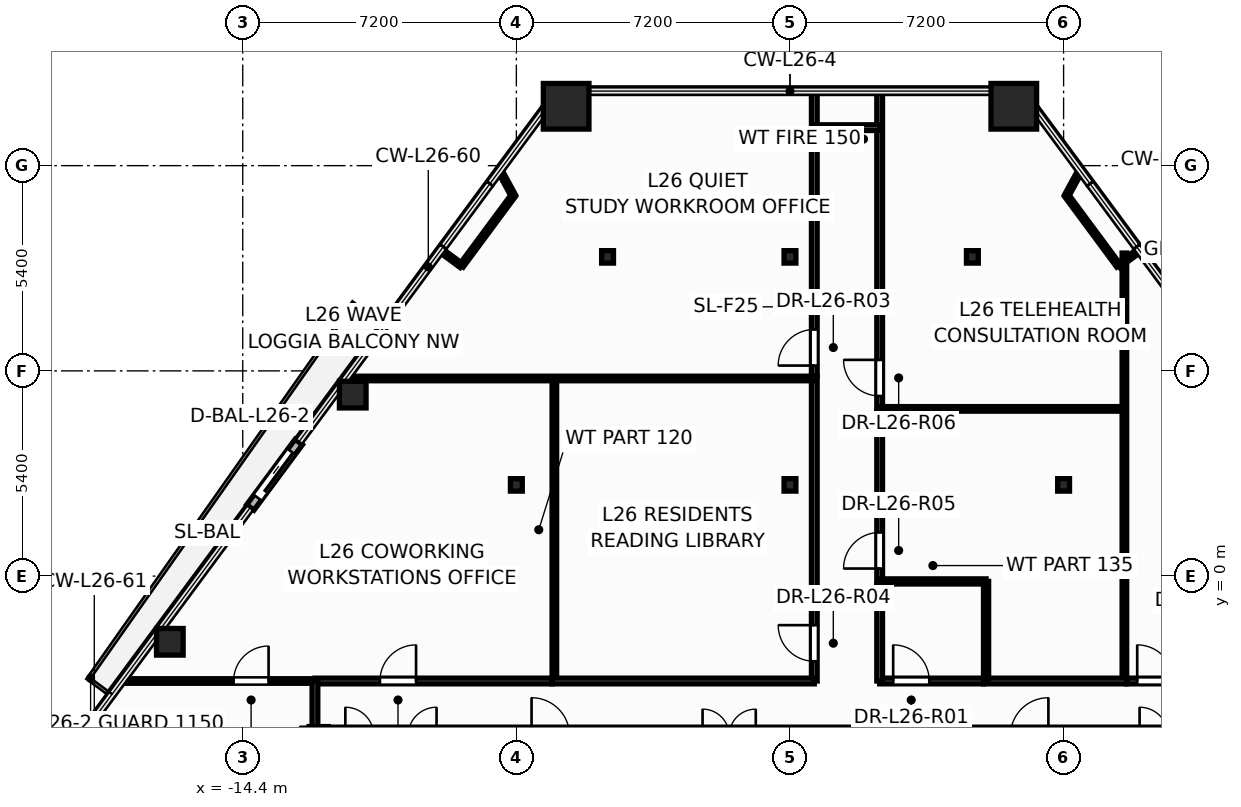
"""IFC4 building model, lengths in metres.
Left out: names, types, materials, properties, quantities, classifications, styles, units other than length and angle.
Written with IfcOpenShell. Run it as: python <this file> out.ifc"""

import sys

from ifc_helpers import new_model, si_unit, direction, frame, frame_2d, origin, origin_2d, place, context, subcontext, project, spatial, rectangle, hollow_rectangle, hollow_circle, i_section, extrude, element, fill, save


model = new_model("IFC4")
c1 = context("Model", 3, precision=1e-05, world=origin(), true_north=direction((0.0, 1.0)))
c2 = subcontext(c1, "Body", "Model", "MODEL_VIEW")
j1 = project(units=[si_unit("LENGTHUNIT", "METRE"), si_unit("PLANEANGLEUNIT", "RADIAN")], contexts=[c1])
p1 = place(None, origin())
s1 = spatial("IfcSite", under=j1, at=p1, CompositionType="ELEMENT")
p2 = place(p1, origin())
s2 = spatial("IfcBuilding", under=s1, at=p2, CompositionType="ELEMENT")
p3 = place(p2, frame((0.0, 0.0, 103.2)))
s3 = spatial("IfcBuildingStorey", under=s2, at=p3, CompositionType="ELEMENT", Elevation=103.2)
for number, where, z_axis, x_axis in (
    (1, (5.89, 12.362, 0.0), (0.0, 0.0, 1.0), (1.0, 0.0, 0.0)),
    (2, (-5.89, 12.362, 0.0), (0.0, 0.0, 1.0), (1.0, 0.0, 0.0)),
):
    element("IfcColumn", number, at=place(p3, frame(where, z_axis=z_axis, x_axis=x_axis)), inside=s3, PredefinedType="COLUMN", context=c2, shape_type="SweptSolid", body=[
        extrude(hollow_rectangle(XDim=1.2, YDim=1.2, WallThickness=0.055, at=origin_2d()), origin(), (0.0, 0.0, 1.0), 3.6),
    ])
for number, where, z_axis, x_axis in (
    (3, (-11.506, 4.775, 0.0), (0.0, 0.0, 1.0), (1.0, 0.0, 0.0)),
    (4, (-16.319, -1.729, 0.0), (0.0, 0.0, 1.0), (1.0, 0.0, 0.0)),
):
    element("IfcColumn", number, at=place(p3, frame(where, z_axis=z_axis, x_axis=x_axis)), inside=s3, PredefinedType="COLUMN", context=c2, shape_type="SweptSolid", body=[
        extrude(hollow_circle(Radius=0.35, WallThickness=0.03, at=origin_2d()), origin(), (0.0, 0.0, 1.0), 3.6),
    ])
p4 = place(p3, frame((-12.4, -4.2, 0.0), z_axis=(0.0, 0.0, 1.0), x_axis=(1.0, 0.0, 0.0)))
e5 = element("IfcColumn", 5, at=p4, inside=s3, PredefinedType="COLUMN", context=c2, shape_type="SweptSolid", body=[
    extrude(i_section(OverallWidth=0.5, OverallDepth=0.482, WebThickness=0.04, FlangeThickness=0.045, at=origin_2d()), origin(), (0.0, 0.0, 1.0), 3.6),
])
for number, where, z_axis, x_axis in (
    (6, (-7.2, 2.4, 0.0), (0.0, 0.0, 1.0), (1.0, 0.0, 0.0)),
    (7, (0.0, 2.4, 0.0), (0.0, 0.0, 1.0), (1.0, 0.0, 0.0)),
    (8, (7.2, 2.4, 0.0), (0.0, 0.0, 1.0), (1.0, 0.0, 0.0)),
    (9, (-4.8, 8.4, 0.0), (0.0, 0.0, 1.0), (1.0, 0.0, 0.0)),
    (10, (0.0, 8.4, 0.0), (0.0, 0.0, 1.0), (1.0, 0.0, 0.0)),
    (11, (4.8, 8.4, 0.0), (0.0, 0.0, 1.0), (1.0, 0.0, 0.0)),
):
    element("IfcColumn", number, at=place(p3, frame(where, z_axis=z_axis, x_axis=x_axis)), inside=s3, PredefinedType="COLUMN", context=c2, shape_type="SweptSolid", body=[
        extrude(i_section(OverallWidth=0.311, OverallDepth=0.327, WebThickness=0.016, FlangeThickness=0.025, at=origin_2d()), origin(), (0.0, 0.0, 1.0), 3.6),
    ])
p5 = place(p3, frame((-12.926, 3.528, -0.015), z_axis=(0.0, 0.0, 1.0), x_axis=(-0.594840056707, -0.803844081235, 0.0)))
e12 = element("IfcWall", 12, at=p5, inside=s3, PredefinedType="STANDARD", context=c2, shape_type="SweptSolid", body=[
    extrude(rectangle(XDim=2.14, YDim=0.24, at=frame_2d((1.07, 0.0))), origin(), (0.0, 0.0, 1.0), 2.728),
])
p6 = place(p5, frame((0.32, 0.0, 0.015)))
e13 = element("IfcOpeningElement", 13, at=p6, cuts=e12, PredefinedType="OPENING", context=c2, shape_type="SweptSolid", body=[
    extrude(rectangle(XDim=1.506, YDim=2.204, at=frame_2d((0.75, 1.102))), frame((0.0, 0.13, 0.0), z_axis=(0.0, -1.0, 0.0), x_axis=(1.0, 0.0, 0.0)), (0.0, 0.0, 1.0), 0.26),
])
p7 = place(p3, frame((-12.65, -4.2, 0.0), z_axis=(0.0, 0.0, 1.0), x_axis=(1.0, 0.0, 0.0)))
e14 = element("IfcWall", 14, at=p7, inside=s3, PredefinedType="SHEAR", context=c2, shape_type="SweptSolid", body=[
    extrude(rectangle(XDim=25.3, YDim=0.45, at=frame_2d((12.65, 0.0))), origin(), (0.0, 0.0, 1.0), 3.6),
])
p8 = place(p7, frame((0.95, 0.0, 0.0)))
e15 = element("IfcOpeningElement", 15, at=p8, cuts=e14, PredefinedType="OPENING", context=c2, shape_type="SweptSolid", body=[
    extrude(rectangle(XDim=0.756, YDim=2.054, at=frame_2d((0.375, 1.027))), frame((0.0, 0.235, 0.0), z_axis=(0.0, -1.0, 0.0), x_axis=(1.0, 0.0, 0.0)), (0.0, 0.0, 1.0), 0.47),
])
p9 = place(p7, frame((2.6, 0.0, 0.0)))
e16 = element("IfcOpeningElement", 16, at=p9, cuts=e14, PredefinedType="OPENING", context=c2, shape_type="SweptSolid", body=[
    extrude(rectangle(XDim=0.756, YDim=2.054, at=frame_2d((0.375, 1.027))), frame((0.0, 0.235, 0.0), z_axis=(0.0, -1.0, 0.0), x_axis=(1.0, 0.0, 0.0)), (0.0, 0.0, 1.0), 0.47),
])
p10 = place(p7, frame((21.85, 0.0, 0.0)))
e17 = element("IfcOpeningElement", 17, at=p10, cuts=e14, PredefinedType="OPENING", context=c2, shape_type="SweptSolid", body=[
    extrude(rectangle(XDim=0.756, YDim=2.054, at=frame_2d((0.375, 1.027))), frame((0.0, 0.235, 0.0), z_axis=(0.0, -1.0, 0.0), x_axis=(1.0, 0.0, 0.0)), (0.0, 0.0, 1.0), 0.47),
])
p11 = place(p7, frame((23.5, 0.0, 0.0)))
e18 = element("IfcOpeningElement", 18, at=p11, cuts=e14, PredefinedType="OPENING", context=c2, shape_type="SweptSolid", body=[
    extrude(rectangle(XDim=0.756, YDim=2.054, at=frame_2d((0.375, 1.027))), frame((0.0, 0.235, 0.0), z_axis=(0.0, -1.0, 0.0), x_axis=(1.0, 0.0, 0.0)), (0.0, 0.0, 1.0), 0.47),
])
p12 = place(p7, frame((5.85, 0.0, 0.0)))
e19 = element("IfcOpeningElement", 19, at=p12, cuts=e14, PredefinedType="OPENING", context=c2, shape_type="SweptSolid", body=[
    extrude(rectangle(XDim=1.006, YDim=2.104, at=frame_2d((0.5, 1.052))), frame((0.0, 0.235, 0.0), z_axis=(0.0, -1.0, 0.0), x_axis=(1.0, 0.0, 0.0)), (0.0, 0.0, 1.0), 0.47),
])
p13 = place(p7, frame((10.35, 0.0, 0.0)))
e20 = element("IfcOpeningElement", 20, at=p13, cuts=e14, PredefinedType="OPENING", context=c2, shape_type="SweptSolid", body=[
    extrude(rectangle(XDim=1.406, YDim=2.154, at=frame_2d((0.7, 1.077))), frame((0.0, 0.235, 0.0), z_axis=(0.0, -1.0, 0.0), x_axis=(1.0, 0.0, 0.0)), (0.0, 0.0, 1.0), 0.47),
])
p14 = place(p7, frame((18.45, 0.0, 0.0)))
e21 = element("IfcOpeningElement", 21, at=p14, cuts=e14, PredefinedType="OPENING", context=c2, shape_type="SweptSolid", body=[
    extrude(rectangle(XDim=1.006, YDim=2.104, at=frame_2d((0.5, 1.052))), frame((0.0, 0.235, 0.0), z_axis=(0.0, -1.0, 0.0), x_axis=(1.0, 0.0, 0.0)), (0.0, 0.0, 1.0), 0.47),
])
p15 = place(p3, frame((2.36, 4.34, 0.0), z_axis=(0.0, 0.0, 1.0), x_axis=(0.0, 1.0, 0.0)))
e22 = element("IfcWall", 22, at=p15, inside=s3, PredefinedType="PARTITIONING", context=c2, shape_type="SweptSolid", body=[
    extrude(rectangle(XDim=8.422, YDim=0.15, at=frame_2d((4.211, 0.0))), origin(), (0.0, 0.0, 1.0), 2.617),
])
p16 = place(p15, frame((0.4, 0.0, 0.0)))
e23 = element("IfcOpeningElement", 23, at=p16, cuts=e22, PredefinedType="OPENING", context=c2, shape_type="SweptSolid", body=[
    extrude(rectangle(XDim=0.956, YDim=2.104, at=frame_2d((0.475, 1.052))), frame((0.0, 0.085, 0.0), z_axis=(0.0, -1.0, 0.0), x_axis=(1.0, 0.0, 0.0)), (0.0, 0.0, 1.0), 0.17),
])
p17 = place(p3, frame((0.64, -2.76, 0.0), z_axis=(0.0, 0.0, 1.0), x_axis=(0.0, 1.0, 0.0)))
e24 = element("IfcWall", 24, at=p17, inside=s3, PredefinedType="PARTITIONING", context=c2, shape_type="SweptSolid", body=[
    extrude(rectangle(XDim=8.02, YDim=0.15, at=frame_2d((4.01, 0.0))), origin(), (0.0, 0.0, 1.0), 2.325),
])
p18 = place(p17, frame((0.519, 0.0, 0.0)))
e25 = element("IfcOpeningElement", 25, at=p18, cuts=e24, PredefinedType="OPENING", context=c2, shape_type="SweptSolid", body=[
    extrude(rectangle(XDim=0.956, YDim=2.104, at=frame_2d((0.475, 1.052))), frame((0.0, 0.085, 0.0), z_axis=(0.0, -1.0, 0.0), x_axis=(1.0, 0.0, 0.0)), (0.0, 0.0, 1.0), 0.17),
])
p19 = place(p3, frame((-6.2, -2.76, 0.0), z_axis=(0.0, 0.0, 1.0), x_axis=(0.0, 1.0, 0.0)))
e26 = element("IfcWall", 26, at=p19, inside=s3, PredefinedType="PARTITIONING", context=c2, shape_type="SweptSolid", body=[
    extrude(rectangle(XDim=7.96, YDim=0.12, at=frame_2d((3.98, 0.0))), origin(), (0.0, 0.0, 1.0), 2.325),
])
p20 = place(p3, frame((0.64, 5.262, 0.0), z_axis=(0.0, 0.0, 1.0), x_axis=(0.0, 1.0, 0.0)))
e27 = element("IfcWall", 27, at=p20, inside=s3, PredefinedType="PARTITIONING", context=c2, shape_type="SweptSolid", body=[
    extrude(rectangle(XDim=7.5, YDim=0.15, at=frame_2d((3.75, 0.0))), origin(), (0.0, 0.0, 1.0), 2.617),
])
p21 = place(p20, frame((0.278, 0.0, 0.0)))
e28 = element("IfcOpeningElement", 28, at=p21, cuts=e27, PredefinedType="OPENING", context=c2, shape_type="SweptSolid", body=[
    extrude(rectangle(XDim=0.956, YDim=2.104, at=frame_2d((0.475, 1.052))), frame((0.0, 0.085, 0.0), z_axis=(0.0, -1.0, 0.0), x_axis=(1.0, 0.0, 0.0)), (0.0, 0.0, 1.0), 0.17),
])
p22 = place(p3, frame((8.8, -2.76, 0.0), z_axis=(0.0, 0.0, 1.0), x_axis=(0.0, 1.0, 0.0)))
e29 = element("IfcWall", 29, at=p22, inside=s3, PredefinedType="PARTITIONING", context=c2, shape_type="SweptSolid", body=[
    extrude(rectangle(XDim=11.26, YDim=0.12, at=frame_2d((5.63, 0.0))), origin(), (0.0, 0.0, 1.0), 2.617),
])
p23 = place(p3, frame((-6.26, -2.76, 0.0), z_axis=(0.0, 0.0, 1.0), x_axis=(1.0, 0.0, 0.0)))
e30 = element("IfcWall", 30, at=p23, inside=s3, PredefinedType="PARTITIONING", context=c2, shape_type="SweptSolid", body=[
    extrude(rectangle(XDim=6.9, YDim=0.15, at=frame_2d((3.45, 0.0))), origin(), (0.0, 0.0, 1.0), 2.325),
])
p24 = place(p3, frame((-11.689, 5.2, 0.0), z_axis=(0.0, 0.0, 1.0), x_axis=(1.0, 0.0, 0.0)))
e31 = element("IfcWall", 31, at=p24, inside=s3, PredefinedType="PARTITIONING", context=c2, shape_type="SweptSolid", body=[
    extrude(rectangle(XDim=12.329, YDim=0.12, at=frame_2d((6.164, 0.0))), origin(), (0.0, 0.0, 1.0), 2.325),
])
p25 = place(p3, frame((2.36, 4.4, 0.0), z_axis=(0.0, 0.0, 1.0), x_axis=(1.0, 0.0, 0.0)))
e32 = element("IfcWall", 32, at=p25, inside=s3, PredefinedType="PARTITIONING", context=c2, shape_type="SweptSolid", body=[
    extrude(rectangle(XDim=6.44, YDim=0.12, at=frame_2d((3.22, 0.0))), origin(), (0.0, 0.0, 1.0), 2.617),
])
p26 = place(p3, frame((-12.5, -2.76, 0.0), z_axis=(0.0, 0.0, 1.0), x_axis=(1.0, 0.0, 0.0)))
e33 = element("IfcWall", 33, at=p26, inside=s3, PredefinedType="PARTITIONING", context=c2, shape_type="SweptSolid", body=[
    extrude(rectangle(XDim=6.238, YDim=0.15, at=frame_2d((3.119, 0.0))), origin(), (0.0, 0.0, 1.0), 2.325),
])
p27 = place(p26, frame((1.711, 0.0, 0.0)))
e34 = element("IfcOpeningElement", 34, at=p27, cuts=e33, PredefinedType="OPENING", context=c2, shape_type="SweptSolid", body=[
    extrude(rectangle(XDim=0.956, YDim=2.104, at=frame_2d((0.475, 1.052))), frame((0.0, 0.085, 0.0), z_axis=(0.0, -1.0, 0.0), x_axis=(1.0, 0.0, 0.0)), (0.0, 0.0, 1.0), 0.17),
])
p28 = place(p3, frame((-17.58, -2.76, 0.0), z_axis=(0.0, 0.0, 1.0), x_axis=(1.0, 0.0, 0.0)))
e35 = element("IfcWall", 35, at=p28, inside=s3, PredefinedType="PARTITIONING", context=c2, shape_type="SweptSolid", body=[
    extrude(rectangle(XDim=5.14, YDim=0.12, at=frame_2d((2.57, 0.0))), origin(), (0.0, 0.0, 1.0), 2.713),
])
p29 = place(p28, frame((2.94, 0.0, 0.0)))
e36 = element("IfcOpeningElement", 36, at=p29, cuts=e35, PredefinedType="OPENING", context=c2, shape_type="SweptSolid", body=[
    extrude(rectangle(XDim=0.926, YDim=2.104, at=frame_2d((0.46, 1.052))), frame((0.0, 0.07, 0.0), z_axis=(0.0, -1.0, 0.0), x_axis=(1.0, 0.0, 0.0)), (0.0, 0.0, 1.0), 0.14),
])
p30 = place(p3, frame((2.36, -0.2, 0.0), z_axis=(0.0, 0.0, 1.0), x_axis=(0.0, 1.0, 0.0)))
e37 = element("IfcWall", 37, at=p30, inside=s3, PredefinedType="PARTITIONING", context=c2, shape_type="SweptSolid", body=[
    extrude(rectangle(XDim=4.538, YDim=0.15, at=frame_2d((2.269, 0.0))), origin(), (0.0, 0.0, 1.0), 2.325),
])
p31 = place(p30, frame((0.399, 0.0, 0.0)))
e38 = element("IfcOpeningElement", 38, at=p31, cuts=e37, PredefinedType="OPENING", context=c2, shape_type="SweptSolid", body=[
    extrude(rectangle(XDim=0.956, YDim=2.104, at=frame_2d((0.475, 1.052))), frame((0.0, 0.085, 0.0), z_axis=(0.0, -1.0, 0.0), x_axis=(1.0, 0.0, 0.0)), (0.0, 0.0, 1.0), 0.17),
])
p32 = place(p3, frame((5.1, -2.76, 0.0), z_axis=(0.0, 0.0, 1.0), x_axis=(1.0, 0.0, 0.0)))
e39 = element("IfcWall", 39, at=p32, inside=s3, PredefinedType="PARTITIONING", context=c2, shape_type="SweptSolid", body=[
    extrude(rectangle(XDim=3.76, YDim=0.15, at=frame_2d((1.88, 0.0))), origin(), (0.0, 0.0, 1.0), 2.325),
])
p33 = place(p3, frame((8.862, -2.76, 0.0), z_axis=(0.0, 0.0, 1.0), x_axis=(1.0, 0.0, 0.0)))
e40 = element("IfcWall", 40, at=p33, inside=s3, PredefinedType="PARTITIONING", context=c2, shape_type="SweptSolid", body=[
    extrude(rectangle(XDim=3.638, YDim=0.15, at=frame_2d((1.819, 0.0))), origin(), (0.0, 0.0, 1.0), 3.35),
])
p34 = place(p33, frame((0.275, 0.0, 0.0)))
e41 = element("IfcOpeningElement", 41, at=p34, cuts=e40, PredefinedType="OPENING", context=c2, shape_type="SweptSolid", body=[
    extrude(rectangle(XDim=0.956, YDim=2.104, at=frame_2d((0.475, 1.052))), frame((0.0, 0.085, 0.0), z_axis=(0.0, -1.0, 0.0), x_axis=(1.0, 0.0, 0.0)), (0.0, 0.0, 1.0), 0.17),
])
p35 = place(p3, frame((2.36, -2.76, 0.0), z_axis=(0.0, 0.0, 1.0), x_axis=(1.0, 0.0, 0.0)))
e42 = element("IfcWall", 42, at=p35, inside=s3, PredefinedType="PARTITIONING", context=c2, shape_type="SweptSolid", body=[
    extrude(rectangle(XDim=2.738, YDim=0.15, at=frame_2d((1.369, 0.0))), origin(), (0.0, 0.0, 1.0), 2.919),
])
p36 = place(p35, frame((0.356, 0.0, 0.0)))
e43 = element("IfcOpeningElement", 43, at=p36, cuts=e42, PredefinedType="OPENING", context=c2, shape_type="SweptSolid", body=[
    extrude(rectangle(XDim=0.956, YDim=2.104, at=frame_2d((0.475, 1.052))), frame((0.0, 0.085, 0.0), z_axis=(0.0, -1.0, 0.0), x_axis=(1.0, 0.0, 0.0)), (0.0, 0.0, 1.0), 0.17),
])
p37 = place(p3, frame((2.36, -0.14, 0.0), z_axis=(0.0, 0.0, 1.0), x_axis=(1.0, 0.0, 0.0)))
e44 = element("IfcWall", 44, at=p37, inside=s3, PredefinedType="PARTITIONING", context=c2, shape_type="SweptSolid", body=[
    extrude(rectangle(XDim=2.8, YDim=0.135, at=frame_2d((1.4, 0.0))), origin(), (0.0, 0.0, 1.0), 2.919),
])
p38 = place(p3, frame((2.36, -2.76, 0.0), z_axis=(0.0, 0.0, 1.0), x_axis=(0.0, 1.0, 0.0)))
e45 = element("IfcWall", 45, at=p38, inside=s3, PredefinedType="PARTITIONING", context=c2, shape_type="SweptSolid", body=[
    extrude(rectangle(XDim=2.558, YDim=0.15, at=frame_2d((1.279, 0.0))), origin(), (0.0, 0.0, 1.0), 3.35),
])
p39 = place(p3, frame((5.16, -2.76, 0.0), z_axis=(0.0, 0.0, 1.0), x_axis=(0.0, 1.0, 0.0)))
e46 = element("IfcWall", 46, at=p39, inside=s3, PredefinedType="PARTITIONING", context=c2, shape_type="SweptSolid", body=[
    extrude(rectangle(XDim=2.62, YDim=0.135, at=frame_2d((1.31, 0.0))), origin(), (0.0, 0.0, 1.0), 3.35),
])
for number, where, z_axis, x_axis in (
    (47, (-7.281, 10.013, 0.0), (0.0, 0.0, 1.0), (-0.595, -0.804, 0.0)),
    (48, (8.646, 8.169, 0.0), (0.0, 0.0, 1.0), (-0.595, 0.804, 0.0)),
):
    element("IfcWall", number, at=place(p3, frame(where, z_axis=z_axis, x_axis=x_axis)), inside=s3, PredefinedType="PARTITIONING", context=c2, shape_type="SweptSolid", body=[
        extrude(rectangle(XDim=2.294, YDim=0.12, at=frame_2d((1.147, 0.0))), origin(), (0.0, 0.0, 1.0), 3.35),
    ])
p40 = place(p3, frame((-12.5, -4.24, 0.0), z_axis=(0.0, 0.0, 1.0), x_axis=(0.0, 1.0, 0.0)))
e49 = element("IfcWall", 49, at=p40, inside=s3, PredefinedType="PARTITIONING", context=c2, shape_type="SweptSolid", body=[
    extrude(rectangle(XDim=1.48, YDim=0.15, at=frame_2d((0.74, 0.0))), origin(), (0.0, 0.0, 1.0), 2.325),
])
p41 = place(p3, frame((0.64, 11.8, 0.0), z_axis=(0.0, 0.0, 1.0), x_axis=(1.0, 0.0, 0.0)))
e50 = element("IfcWall", 50, at=p41, inside=s3, PredefinedType="PARTITIONING", context=c2, shape_type="SweptSolid", body=[
    extrude(rectangle(XDim=1.72, YDim=0.15, at=frame_2d((0.86, 0.0))), origin(), (0.0, 0.0, 1.0), 3.35),
])
for number, where, z_axis, x_axis in (
    (51, (-7.634, 10.662, 0.0), (0.0, 0.0, 1.0), (0.478, -0.878, 0.0)),
    (52, (7.281, 10.013, 0.0), (0.0, 0.0, 1.0), (0.478, 0.878, 0.0)),
):
    element("IfcWall", number, at=place(p3, frame(where, z_axis=z_axis, x_axis=x_axis)), inside=s3, PredefinedType="PARTITIONING", context=c2, shape_type="SweptSolid", body=[
        extrude(rectangle(XDim=0.739, YDim=0.12, at=frame_2d((0.369, 0.0))), origin(), (0.0, 0.0, 1.0), 2.713),
    ])
for number, where, z_axis, x_axis in (
    (53, (-8.646, 8.169, 0.0), (0.0, 0.0, 1.0), (-0.804, 0.595, 0.0)),
    (54, (9.184, 8.567, 0.0), (0.0, 0.0, 1.0), (-0.804, -0.595, 0.0)),
):
    element("IfcWall", number, at=place(p3, frame(where, z_axis=z_axis, x_axis=x_axis)), inside=s3, PredefinedType="PARTITIONING", context=c2, shape_type="SweptSolid", body=[
        extrude(rectangle(XDim=0.67, YDim=0.12, at=frame_2d((0.335, 0.0))), origin(), (0.0, 0.0, 1.0), 2.713),
    ])
p42 = place(p6, origin())
e55 = element("IfcDoor", 55, at=p42, inside=s3, OperationType="SLIDING_TO_RIGHT", PredefinedType="DOOR", context=c2, shape_type="SweptSolid", body=[
    extrude(rectangle(XDim=1.5, YDim=2.2, at=frame_2d((0.75, 1.1))), frame((0.0, 0.025, 0.0), z_axis=(0.0, -1.0, 0.0), x_axis=(1.0, 0.0, 0.0)), (0.0, 0.0, 1.0), 0.05),
])
fill(e13, e55)
p43 = place(p36, origin())
e56 = element("IfcDoor", 56, at=p43, inside=s3, OperationType="SINGLE_SWING_LEFT", PredefinedType="DOOR", context=c2, shape_type="SweptSolid", body=[
    extrude(rectangle(XDim=0.95, YDim=2.1, at=frame_2d((0.475, 1.05))), frame((0.0, 0.025, 0.0), z_axis=(0.0, -1.0, 0.0), x_axis=(1.0, 0.0, 0.0)), (0.0, 0.0, 1.0), 0.05),
])
fill(e43, e56)
p44 = place(p27, origin())
e57 = element("IfcDoor", 57, at=p44, inside=s3, OperationType="SINGLE_SWING_RIGHT", PredefinedType="DOOR", context=c2, shape_type="SweptSolid", body=[
    extrude(rectangle(XDim=0.95, YDim=2.1, at=frame_2d((0.475, 1.05))), frame((0.0, 0.025, 0.0), z_axis=(0.0, -1.0, 0.0), x_axis=(1.0, 0.0, 0.0)), (0.0, 0.0, 1.0), 0.05),
])
fill(e34, e57)
p45 = place(p21, origin())
e58 = element("IfcDoor", 58, at=p45, inside=s3, OperationType="SINGLE_SWING_LEFT", PredefinedType="DOOR", context=c2, shape_type="SweptSolid", body=[
    extrude(rectangle(XDim=0.95, YDim=2.1, at=frame_2d((0.475, 1.05))), frame((0.0, 0.025, 0.0), z_axis=(0.0, -1.0, 0.0), x_axis=(1.0, 0.0, 0.0)), (0.0, 0.0, 1.0), 0.05),
])
fill(e28, e58)
p46 = place(p18, origin())
e59 = element("IfcDoor", 59, at=p46, inside=s3, OperationType="SINGLE_SWING_RIGHT", PredefinedType="DOOR", context=c2, shape_type="SweptSolid", body=[
    extrude(rectangle(XDim=0.95, YDim=2.1, at=frame_2d((0.475, 1.05))), frame((0.0, 0.025, 0.0), z_axis=(0.0, -1.0, 0.0), x_axis=(1.0, 0.0, 0.0)), (0.0, 0.0, 1.0), 0.05),
])
fill(e25, e59)
p47 = place(p31, origin())
e60 = element("IfcDoor", 60, at=p47, inside=s3, OperationType="SINGLE_SWING_LEFT", PredefinedType="DOOR", context=c2, shape_type="SweptSolid", body=[
    extrude(rectangle(XDim=0.95, YDim=2.1, at=frame_2d((0.475, 1.05))), frame((0.0, 0.025, 0.0), z_axis=(0.0, -1.0, 0.0), x_axis=(1.0, 0.0, 0.0)), (0.0, 0.0, 1.0), 0.05),
])
fill(e38, e60)
p48 = place(p16, origin())
e61 = element("IfcDoor", 61, at=p48, inside=s3, OperationType="SINGLE_SWING_RIGHT", PredefinedType="DOOR", context=c2, shape_type="SweptSolid", body=[
    extrude(rectangle(XDim=0.95, YDim=2.1, at=frame_2d((0.475, 1.05))), frame((0.0, 0.025, 0.0), z_axis=(0.0, -1.0, 0.0), x_axis=(1.0, 0.0, 0.0)), (0.0, 0.0, 1.0), 0.05),
])
fill(e23, e61)
p49 = place(p34, origin())
e62 = element("IfcDoor", 62, at=p49, inside=s3, OperationType="SINGLE_SWING_LEFT", PredefinedType="DOOR", context=c2, shape_type="SweptSolid", body=[
    extrude(rectangle(XDim=0.95, YDim=2.1, at=frame_2d((0.475, 1.05))), frame((0.0, 0.025, 0.0), z_axis=(0.0, -1.0, 0.0), x_axis=(1.0, 0.0, 0.0)), (0.0, 0.0, 1.0), 0.05),
])
fill(e41, e62)
p50 = place(p29, origin())
e63 = element("IfcDoor", 63, at=p50, inside=s3, OperationType="SINGLE_SWING_RIGHT", PredefinedType="DOOR", context=c2, shape_type="SweptSolid", body=[
    extrude(rectangle(XDim=0.92, YDim=2.1, at=frame_2d((0.46, 1.05))), frame((0.0, 0.025, 0.0), z_axis=(0.0, -1.0, 0.0), x_axis=(1.0, 0.0, 0.0)), (0.0, 0.0, 1.0), 0.05),
])
fill(e36, e63)
save(model, sys.argv[1])
